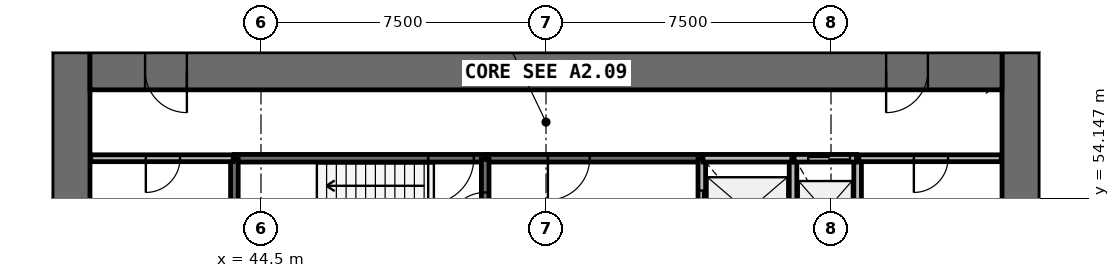
"""IFC4 building model, lengths in metres.
Left out: names, types, materials, properties, quantities, classifications, styles, units other than length and angle.
Written with IfcOpenShell. Run it as: python <this file> out.ifc"""

import sys

from ifc_helpers import new_model, si_unit, direction, frame, frame_2d, origin, place, context, subcontext, project, spatial, rectangle, extrude, source, transform, mapped, element, fill, save


model = new_model("IFC4")
c1 = context("Model", 3, precision=1e-05, world=origin(), true_north=direction((0.0, 1.0)))
c2 = subcontext(c1, "Body", "Model", "MODEL_VIEW")
j1 = project(units=[si_unit("LENGTHUNIT", "METRE"), si_unit("PLANEANGLEUNIT", "RADIAN")], contexts=[c1])
p1 = place(None, origin())
s1 = spatial("IfcSite", under=j1, at=p1, CompositionType="ELEMENT")
p2 = place(p1, origin())
s2 = spatial("IfcBuilding", under=s1, at=p2, CompositionType="ELEMENT")
p3 = place(p2, frame((0.0, 0.0, 35.8)))
s3 = spatial("IfcBuildingStorey", under=s2, at=p3, CompositionType="ELEMENT", Elevation=35.8)
p4 = place(p3, frame((64.5, 38.0, 0.0), z_axis=(0.0, 0.0, 1.0), x_axis=(0.0, 1.0, 0.0)))
e1 = element("IfcWall", 1, at=p4, inside=s3, PredefinedType="SHEAR", context=c2, shape_type="SweptSolid", body=[
    extrude(rectangle(XDim=20.0, YDim=1.0, at=frame_2d((10.0, 0.0))), origin(), (0.0, 0.0, 1.0), 4.4),
])
p5 = place(p4, frame((9.1, 0.0, 0.0)))
e2 = element("IfcOpeningElement", 2, at=p5, cuts=e1, PredefinedType="OPENING", context=c2, shape_type="SweptSolid", body=[
    extrude(rectangle(XDim=1.8, YDim=2.1, at=frame_2d((0.9, 1.05))), frame((0.0, 0.51, 0.0), z_axis=(0.0, -1.0, 0.0), x_axis=(1.0, 0.0, 0.0)), (0.0, 0.0, 1.0), 1.02),
])
p6 = place(p3, frame((39.5, 58.0, 0.0), z_axis=(0.0, 0.0, 1.0), x_axis=(0.0, -1.0, 0.0)))
e3 = element("IfcWall", 3, at=p6, inside=s3, PredefinedType="SHEAR", context=c2, shape_type="SweptSolid", body=[
    extrude(rectangle(XDim=20.0, YDim=1.0, at=frame_2d((10.0, 0.0))), origin(), (0.0, 0.0, 1.0), 4.4),
])
p7 = place(p6, frame((9.1, 0.0, 0.0)))
e4 = element("IfcOpeningElement", 4, at=p7, cuts=e3, PredefinedType="OPENING", context=c2, shape_type="SweptSolid", body=[
    extrude(rectangle(XDim=1.8, YDim=2.1, at=frame_2d((0.9, 1.05))), frame((0.0, 0.51, 0.0), z_axis=(0.0, -1.0, 0.0), x_axis=(1.0, 0.0, 0.0)), (0.0, 0.0, 1.0), 1.02),
])
p8 = place(p3, frame((64.0, 57.5, 0.0), z_axis=(0.0, 0.0, 1.0), x_axis=(-1.0, 0.0, 0.0)))
e5 = element("IfcWall", 5, at=p8, inside=s3, PredefinedType="SHEAR", context=c2, shape_type="SweptSolid", body=[
    extrude(rectangle(XDim=24.0, YDim=1.0, at=frame_2d((12.0, 0.0))), origin(), (0.0, 0.0, 1.0), 4.4),
])
p9 = place(p8, frame((21.45, 0.0, 0.0)))
e6 = element("IfcOpeningElement", 6, at=p9, cuts=e5, PredefinedType="OPENING", context=c2, shape_type="SweptSolid", body=[
    extrude(rectangle(XDim=1.1, YDim=2.1, at=frame_2d((0.55, 1.05))), frame((0.0, 0.51, 0.0), z_axis=(0.0, -1.0, 0.0), x_axis=(1.0, 0.0, 0.0)), (0.0, 0.0, 1.0), 1.02),
])
p10 = place(p8, frame((1.95, 0.0, 0.0)))
e7 = element("IfcOpeningElement", 7, at=p10, cuts=e5, PredefinedType="OPENING", context=c2, shape_type="SweptSolid", body=[
    extrude(rectangle(XDim=1.1, YDim=2.1, at=frame_2d((0.55, 1.05))), frame((0.0, 0.51, 0.0), z_axis=(0.0, -1.0, 0.0), x_axis=(1.0, 0.0, 0.0)), (0.0, 0.0, 1.0), 1.02),
])
p11 = place(p3, frame((50.4, 55.2, 0.0), z_axis=(0.0, 0.0, 1.0), x_axis=(-1.0, 0.0, 0.0)))
e8 = element("IfcWall", 8, at=p11, inside=s3, PredefinedType="SOLIDWALL", context=c2, shape_type="SweptSolid", body=[
    extrude(rectangle(XDim=6.6, YDim=0.2, at=frame_2d((3.3, 0.0))), origin(), (0.0, 0.0, 1.0), 3.95),
])
p12 = place(p11, frame((0.3, 0.0, 0.0)))
e9 = element("IfcOpeningElement", 9, at=p12, cuts=e8, PredefinedType="OPENING", context=c2, shape_type="SweptSolid", body=[
    extrude(rectangle(XDim=1.2, YDim=2.1, at=frame_2d((0.6, 1.05))), frame((0.0, 0.11, 0.0), z_axis=(0.0, -1.0, 0.0), x_axis=(1.0, 0.0, 0.0)), (0.0, 0.0, 1.0), 0.22),
])
p13 = place(p3, frame((56.1, 55.2, 0.0), z_axis=(0.0, 0.0, 1.0), x_axis=(-1.0, 0.0, 0.0)))
e10 = element("IfcWall", 10, at=p13, inside=s3, PredefinedType="SOLIDWALL", context=c2, shape_type="SweptSolid", body=[
    extrude(rectangle(XDim=5.67, YDim=0.2, at=frame_2d((2.835, 0.0))), origin(), (0.0, 0.0, 1.0), 3.95),
])
p14 = place(p13, frame((2.95, 0.0, 0.0)))
e11 = element("IfcOpeningElement", 11, at=p14, cuts=e10, PredefinedType="OPENING", context=c2, shape_type="SweptSolid", body=[
    extrude(rectangle(XDim=1.1, YDim=2.1, at=frame_2d((0.55, 1.05))), frame((0.0, 0.11, 0.0), z_axis=(0.0, -1.0, 0.0), x_axis=(1.0, 0.0, 0.0)), (0.0, 0.0, 1.0), 0.22),
])
p15 = place(p3, frame((50.4, 52.4, 0.0), z_axis=(0.0, 0.0, 1.0), x_axis=(0.0, 1.0, 0.0)))
e12 = element("IfcWall", 12, at=p15, inside=s3, PredefinedType="SOLIDWALL", context=c2, shape_type="SweptSolid", body=[
    extrude(rectangle(XDim=2.77, YDim=0.2, at=frame_2d((1.385, 0.0))), origin(), (0.0, 0.0, 1.0), 3.95),
])
p16 = place(p15, frame((0.9, 0.0, 0.0)))
e13 = element("IfcOpeningElement", 13, at=p16, cuts=e12, PredefinedType="OPENING", context=c2, shape_type="SweptSolid", body=[
    extrude(rectangle(XDim=1.0, YDim=2.1, at=frame_2d((0.5, 1.05))), frame((0.0, 0.11, 0.0), z_axis=(0.0, -1.0, 0.0), x_axis=(1.0, 0.0, 0.0)), (0.0, 0.0, 1.0), 0.22),
])
p17 = place(p3, frame((56.1, 55.17, 0.0), z_axis=(0.0, 0.0, 1.0), x_axis=(0.0, -1.0, 0.0)))
e14 = element("IfcWall", 14, at=p17, inside=s3, PredefinedType="SOLIDWALL", context=c2, shape_type="SweptSolid", body=[
    extrude(rectangle(XDim=2.77, YDim=0.2, at=frame_2d((1.385, 0.0))), origin(), (0.0, 0.0, 1.0), 3.95),
])
p18 = place(p17, frame((0.82, 0.0, 0.0)))
e15 = element("IfcOpeningElement", 15, at=p18, cuts=e14, PredefinedType="OPENING", context=c2, shape_type="SweptSolid", body=[
    extrude(rectangle(XDim=1.1, YDim=2.1, at=frame_2d((0.55, 1.05))), frame((0.0, 0.11, 0.0), z_axis=(0.0, -1.0, 0.0), x_axis=(1.0, 0.0, 0.0)), (0.0, 0.0, 1.0), 0.22),
])
for number, where, z_axis, x_axis in (
    (16, (58.5, 52.4, 0.0), (0.0, 0.0, 1.0), (0.0, 1.0, 0.0)),
    (17, (60.2, 52.4, 0.0), (0.0, 0.0, 1.0), (0.0, 1.0, 0.0)),
):
    element("IfcWall", number, at=place(p3, frame(where, z_axis=z_axis, x_axis=x_axis)), inside=s3, PredefinedType="SOLIDWALL", context=c2, shape_type="SweptSolid", body=[
        extrude(rectangle(XDim=2.8, YDim=0.2, at=frame_2d((1.4, 0.0))), origin(), (0.0, 0.0, 1.0), 3.95),
    ])
p19 = place(p3, frame((58.47, 55.2, 0.0), z_axis=(0.0, 0.0, 1.0), x_axis=(-1.0, 0.0, 0.0)))
e18 = element("IfcWall", 18, at=p19, inside=s3, PredefinedType="SOLIDWALL", context=c2, shape_type="SweptSolid", body=[
    extrude(rectangle(XDim=2.34, YDim=0.2, at=frame_2d((1.17, 0.0))), origin(), (0.0, 0.0, 1.0), 3.95),
])
p20 = place(p3, frame((43.8, 55.17, 0.0), z_axis=(0.0, 0.0, 1.0), x_axis=(0.0, -1.0, 0.0)))
e19 = element("IfcWall", 19, at=p20, inside=s3, PredefinedType="SOLIDWALL", context=c2, shape_type="SweptSolid", body=[
    extrude(rectangle(XDim=2.14, YDim=0.2, at=frame_2d((1.07, 0.0))), origin(), (0.0, 0.0, 1.0), 3.95),
])
p21 = place(p3, frame((60.17, 55.2, 0.0), z_axis=(0.0, 0.0, 1.0), x_axis=(-1.0, 0.0, 0.0)))
e20 = element("IfcWall", 20, at=p21, inside=s3, PredefinedType="SOLIDWALL", context=c2, shape_type="SweptSolid", body=[
    extrude(rectangle(XDim=1.64, YDim=0.2, at=frame_2d((0.82, 0.0))), origin(), (0.0, 0.0, 1.0), 3.95),
])
p22 = place(p21, frame((0.17, 0.0, 0.0)))
e21 = element("IfcOpeningElement", 21, at=p22, cuts=e20, PredefinedType="OPENING", context=c2, shape_type="SweptSolid", body=[
    extrude(rectangle(XDim=1.1, YDim=2.1, at=frame_2d((0.55, 1.05))), frame((0.0, 0.11, 0.0), z_axis=(0.0, -1.0, 0.0), x_axis=(1.0, 0.0, 0.0)), (0.0, 0.0, 1.0), 0.22),
])
p23 = place(p3, frame((43.77, 55.2, 0.0), z_axis=(0.0, 0.0, 1.0), x_axis=(-1.0, 0.0, 0.0)))
e22 = element("IfcWall", 22, at=p23, inside=s3, PredefinedType="PARTITIONING", context=c2, shape_type="SweptSolid", body=[
    extrude(rectangle(XDim=3.75, YDim=0.18, at=frame_2d((1.875, 0.0))), origin(), (0.0, 0.0, 1.0), 3.95),
])
p24 = place(p23, frame((1.4, 0.0, 0.0)))
e23 = element("IfcOpeningElement", 23, at=p24, cuts=e22, PredefinedType="OPENING", context=c2, shape_type="SweptSolid", body=[
    extrude(rectangle(XDim=0.9, YDim=2.1, at=frame_2d((0.45, 1.05))), frame((0.0, 0.1, 0.0), z_axis=(0.0, -1.0, 0.0), x_axis=(1.0, 0.0, 0.0)), (0.0, 0.0, 1.0), 0.2),
])
p25 = place(p3, frame((63.98, 55.2, 0.0), z_axis=(0.0, 0.0, 1.0), x_axis=(-1.0, 0.0, 0.0)))
e24 = element("IfcWall", 24, at=p25, inside=s3, PredefinedType="PARTITIONING", context=c2, shape_type="SweptSolid", body=[
    extrude(rectangle(XDim=3.75, YDim=0.18, at=frame_2d((1.875, 0.0))), origin(), (0.0, 0.0, 1.0), 3.95),
])
p26 = place(p25, frame((1.4, 0.0, 0.0)))
e25 = element("IfcOpeningElement", 25, at=p26, cuts=e24, PredefinedType="OPENING", context=c2, shape_type="SweptSolid", body=[
    extrude(rectangle(XDim=0.9, YDim=2.1, at=frame_2d((0.45, 1.05))), frame((0.0, 0.1, 0.0), z_axis=(0.0, -1.0, 0.0), x_axis=(1.0, 0.0, 0.0)), (0.0, 0.0, 1.0), 0.2),
])
m1 = source(origin(), c2, "Body", "SweptSolid", [
    extrude(rectangle(XDim=1.1, YDim=2.1, at=frame_2d((0.55, 1.05))), frame((0.0, 0.025, 0.0), z_axis=(0.0, -1.0, 0.0), x_axis=(1.0, 0.0, 0.0)), (0.0, 0.0, 1.0), 0.05),
])
p27 = place(p18, origin())
e26 = element("IfcDoor", 26, at=p27, inside=s3, OperationType="DOUBLE_DOOR_SLIDING", PredefinedType="USERDEFINED", context=c2, shape_type="MappedRepresentation", body=[
    mapped(m1, transform((0.0, 0.0, 0.0), scale=1.0)),
])
fill(e15, e26)
p28 = place(p22, origin())
e27 = element("IfcDoor", 27, at=p28, inside=s3, OperationType="DOUBLE_DOOR_SLIDING", PredefinedType="USERDEFINED", context=c2, shape_type="MappedRepresentation", body=[
    mapped(m1, transform((0.0, 0.0, 0.0), scale=1.0)),
])
fill(e21, e27)
m2 = source(origin(), c2, "Body", "SweptSolid", [
    extrude(rectangle(XDim=1.2, YDim=2.1, at=frame_2d((0.6, 1.05))), frame((0.0, 0.025, 0.0), z_axis=(0.0, -1.0, 0.0), x_axis=(1.0, 0.0, 0.0)), (0.0, 0.0, 1.0), 0.05),
])
p29 = place(p12, origin())
e28 = element("IfcDoor", 28, at=p29, inside=s3, OperationType="SINGLE_SWING_RIGHT", PredefinedType="DOOR", context=c2, shape_type="MappedRepresentation", body=[
    mapped(m2, transform((0.0, 0.0, 0.0), scale=1.0)),
])
fill(e9, e28)
m3 = source(origin(), c2, "Body", "SweptSolid", [
    extrude(rectangle(XDim=1.0, YDim=2.1, at=frame_2d((0.5, 1.05))), frame((0.0, 0.025, 0.0), z_axis=(0.0, -1.0, 0.0), x_axis=(1.0, 0.0, 0.0)), (0.0, 0.0, 1.0), 0.05),
])
p30 = place(p16, origin())
e29 = element("IfcDoor", 29, at=p30, inside=s3, OperationType="SINGLE_SWING_LEFT", PredefinedType="DOOR", context=c2, shape_type="MappedRepresentation", body=[
    mapped(m3, transform((0.0, 0.0, 0.0), scale=1.0)),
])
fill(e13, e29)
m4 = source(origin(), c2, "Body", "SweptSolid", [
    extrude(rectangle(XDim=1.1, YDim=2.1, at=frame_2d((0.55, 1.05))), frame((0.0, 0.025, 0.0), z_axis=(0.0, -1.0, 0.0), x_axis=(1.0, 0.0, 0.0)), (0.0, 0.0, 1.0), 0.05),
])
p31 = place(p14, origin())
e30 = element("IfcDoor", 30, at=p31, inside=s3, OperationType="SINGLE_SWING_RIGHT", PredefinedType="DOOR", context=c2, shape_type="MappedRepresentation", body=[
    mapped(m4, transform((0.0, 0.0, 0.0), scale=1.0)),
])
fill(e11, e30)
m5 = source(origin(), c2, "Body", "SweptSolid", [
    extrude(rectangle(XDim=1.1, YDim=2.1, at=frame_2d((0.55, 1.05))), frame((0.0, 0.025, 0.0), z_axis=(0.0, -1.0, 0.0), x_axis=(1.0, 0.0, 0.0)), (0.0, 0.0, 1.0), 0.05),
])
p32 = place(p9, origin())
e31 = element("IfcDoor", 31, at=p32, inside=s3, OperationType="SINGLE_SWING_LEFT", PredefinedType="DOOR", context=c2, shape_type="MappedRepresentation", body=[
    mapped(m5, transform((0.0, 0.0, 0.0), scale=1.0)),
])
fill(e6, e31)
p33 = place(p10, origin())
e32 = element("IfcDoor", 32, at=p33, inside=s3, OperationType="SINGLE_SWING_RIGHT", PredefinedType="DOOR", context=c2, shape_type="MappedRepresentation", body=[
    mapped(m5, transform((0.0, 0.0, 0.0), scale=1.0)),
])
fill(e7, e32)
m6 = source(origin(), c2, "Body", "SweptSolid", [
    extrude(rectangle(XDim=0.9, YDim=2.1, at=frame_2d((0.45, 1.05))), frame((0.0, 0.025, 0.0), z_axis=(0.0, -1.0, 0.0), x_axis=(1.0, 0.0, 0.0)), (0.0, 0.0, 1.0), 0.05),
])
p34 = place(p24, origin())
e33 = element("IfcDoor", 33, at=p34, inside=s3, OperationType="SINGLE_SWING_RIGHT", PredefinedType="DOOR", context=c2, shape_type="MappedRepresentation", body=[
    mapped(m6, transform((0.0, 0.0, 0.0), scale=1.0)),
])
fill(e23, e33)
p35 = place(p26, origin())
e34 = element("IfcDoor", 34, at=p35, inside=s3, OperationType="SINGLE_SWING_RIGHT", PredefinedType="DOOR", context=c2, shape_type="MappedRepresentation", body=[
    mapped(m6, transform((0.0, 0.0, 0.0), scale=1.0)),
])
fill(e25, e34)
save(model, sys.argv[1])
